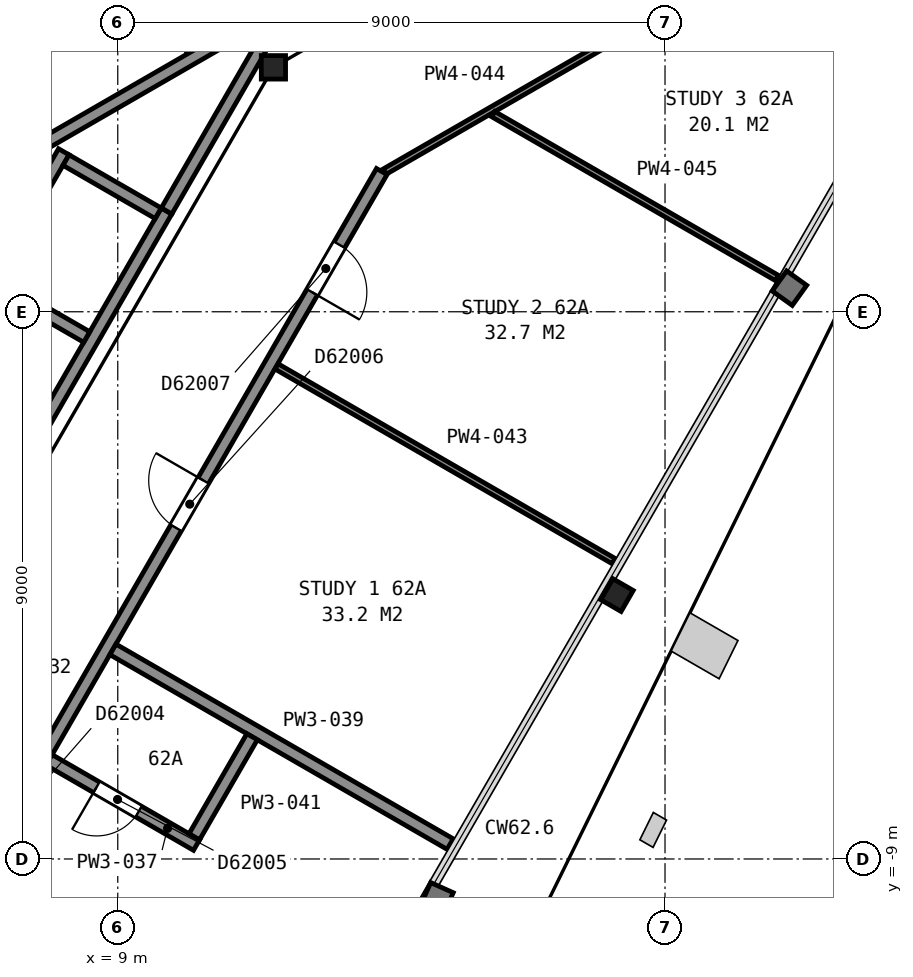
"""IFC4 building model, lengths in metres.
Left out: names, types, materials, properties, quantities, classifications, styles, units other than length and angle.
Written with IfcOpenShell. Run it as: python <this file> out.ifc"""

import sys

from ifc_helpers import new_model, si_unit, direction, frame, frame_2d, origin, origin_2d, place, context, subcontext, project, spatial, rectangle, i_section, extrude, element, fill, save


model = new_model("IFC4")
c1 = context("Model", 3, precision=1e-05, world=origin(), true_north=direction((0.0, 1.0)))
c2 = subcontext(c1, "Body", "Model", "MODEL_VIEW")
j1 = project(units=[si_unit("LENGTHUNIT", "METRE"), si_unit("PLANEANGLEUNIT", "RADIAN")], contexts=[c1])
p1 = place(None, origin())
s1 = spatial("IfcSite", under=j1, at=p1, CompositionType="ELEMENT")
p2 = place(p1, origin())
s2 = spatial("IfcBuilding", under=s1, at=p2, CompositionType="ELEMENT")
p3 = place(p2, frame((0.0, 0.0, 247.1)))
s3 = spatial("IfcBuildingStorey", under=s2, at=p3, CompositionType="ELEMENT", Elevation=247.1)
p4 = place(p3, frame((17.21, -4.66, 0.035), z_axis=(0.0, 0.0, 1.0), x_axis=(-0.5, -0.866025403784, 0.0)))
e1 = element("IfcColumn", 1, at=p4, inside=s3, PredefinedType="COLUMN", context=c2, shape_type="SweptSolid", body=[
    extrude(i_section(OverallWidth=0.399, OverallDepth=0.386, WebThickness=0.021, FlangeThickness=0.033, FilletRadius=0.015, at=origin_2d()), origin(), (0.0, 0.0, 1.0), 3.665),
])
p5 = place(p3, frame((11.56, 4.02, 0.0), z_axis=(0.0, 0.0, 1.0), x_axis=(1.0, 0.0, 0.0)))
e2 = element("IfcColumn", 2, at=p5, inside=s3, PredefinedType="COLUMN", context=c2, shape_type="SweptSolid", body=[
    extrude(i_section(OverallWidth=0.399, OverallDepth=0.386, WebThickness=0.021, FlangeThickness=0.033, FilletRadius=0.015, at=origin_2d()), origin(), (0.0, 0.0, 1.0), 3.7),
])
p6 = place(p3, frame((7.678, 2.701, 0.0), z_axis=(0.0, 0.0, 1.0), x_axis=(0.866019993635, 0.500009370536, 0.0)))
e3 = element("IfcWall", 3, at=p6, inside=s3, PredefinedType="PARTITIONING", context=c2, shape_type="SweptSolid", body=[
    extrude(rectangle(XDim=9.6, YDim=0.2, at=frame_2d((4.8, 0.0))), origin(), (0.0, 0.0, 1.0), 3.45),
])
p7 = place(p3, frame((7.351, -2.587, 0.0), z_axis=(0.0, 0.0, 1.0), x_axis=(0.500002801628, 0.866023786258, 0.0)))
e4 = element("IfcWall", 4, at=p7, inside=s3, PredefinedType="PARTITIONING", context=c2, shape_type="SweptSolid", body=[
    extrude(rectangle(XDim=4.9, YDim=0.2, at=frame_2d((2.45, 0.0))), origin(), (0.0, 0.0, 1.0), 3.7),
])
p8 = place(p3, frame((5.663, -1.612, 0.0), z_axis=(0.0, 0.0, 1.0), x_axis=(0.49998122708, 0.866036242063, 0.0)))
e5 = element("IfcWall", 5, at=p8, inside=s3, PredefinedType="PARTITIONING", context=c2, shape_type="SweptSolid", body=[
    extrude(rectangle(XDim=4.9, YDim=0.2, at=frame_2d((2.45, 0.0))), origin(), (0.0, 0.0, 1.0), 3.7),
])
p9 = place(p3, frame((9.665, 1.62, 0.0), z_axis=(0.0, 0.0, 1.0), x_axis=(-0.866002029911, 0.500040482552, 0.0)))
e6 = element("IfcWall", 6, at=p9, inside=s3, PredefinedType="PARTITIONING", context=c2, shape_type="SweptSolid", body=[
    extrude(rectangle(XDim=1.75, YDim=0.2, at=frame_2d((0.875, 0.0))), origin(), (0.0, 0.0, 1.0), 3.7),
])
p10 = place(p3, frame((8.49, -0.416, 0.0), z_axis=(0.0, 0.0, 1.0), x_axis=(-0.866036909293, 0.499980071345, 0.0)))
e7 = element("IfcWall", 7, at=p10, inside=s3, PredefinedType="PARTITIONING", context=c2, shape_type="SweptSolid", body=[
    extrude(rectangle(XDim=1.75, YDim=0.2, at=frame_2d((0.875, 0.0))), origin(), (0.0, 0.0, 1.0), 3.7),
])
p11 = place(p3, frame((9.803, 1.658, 0.0), z_axis=(0.0, 0.0, 1.0), x_axis=(0.499943114462, 0.866058244174, 0.0)))
e8 = element("IfcWall", 8, at=p11, inside=s3, PredefinedType="PARTITIONING", context=c2, shape_type="SweptSolid", body=[
    extrude(rectangle(XDim=3.576, YDim=0.2, at=frame_2d((1.788, 0.0))), origin(), (0.0, 0.0, 1.0), 3.45),
])
p12 = place(p3, frame((13.342, 2.306, 0.0), z_axis=(0.0, 0.0, 1.0), x_axis=(-0.499983003136, -0.866035216706, 0.0)))
e9 = element("IfcWall", 9, at=p12, inside=s3, PredefinedType="PARTITIONING", context=c2, shape_type="SweptSolid", body=[
    extrude(rectangle(XDim=17.385, YDim=0.2, at=frame_2d((8.692, 0.0))), origin(), (0.0, 0.0, 1.0), 2.713),
])
p13 = place(p12, frame((15.185, 0.0, 0.0)))
e10 = element("IfcOpeningElement", 10, at=p13, cuts=e9, PredefinedType="OPENING", context=c2, shape_type="SweptSolid", body=[
    extrude(rectangle(XDim=0.9, YDim=2.1, at=frame_2d((0.45, 1.05))), frame((0.0, 0.11, 0.0), z_axis=(0.0, -1.0, 0.0), x_axis=(1.0, 0.0, 0.0)), (0.0, 0.0, 1.0), 0.22),
])
p14 = place(p12, frame((12.094, 0.0, 0.0)))
e11 = element("IfcOpeningElement", 11, at=p14, cuts=e9, PredefinedType="OPENING", context=c2, shape_type="SweptSolid", body=[
    extrude(rectangle(XDim=0.9, YDim=2.1, at=frame_2d((0.45, 1.05))), frame((0.0, 0.11, 0.0), z_axis=(0.0, -1.0, 0.0), x_axis=(1.0, 0.0, 0.0)), (0.0, 0.0, 1.0), 0.22),
])
p15 = place(p12, frame((5.867, 0.0, 0.0)))
e12 = element("IfcOpeningElement", 12, at=p15, cuts=e9, PredefinedType="OPENING", context=c2, shape_type="SweptSolid", body=[
    extrude(rectangle(XDim=0.9, YDim=2.1, at=frame_2d((0.45, 1.05))), frame((0.0, 0.11, 0.0), z_axis=(0.0, -1.0, 0.0), x_axis=(1.0, 0.0, 0.0)), (0.0, 0.0, 1.0), 0.22),
])
p16 = place(p12, frame((1.392, 0.0, 0.0)))
e13 = element("IfcOpeningElement", 13, at=p16, cuts=e9, PredefinedType="OPENING", context=c2, shape_type="SweptSolid", body=[
    extrude(rectangle(XDim=0.9, YDim=2.1, at=frame_2d((0.45, 1.05))), frame((0.0, 0.11, 0.0), z_axis=(0.0, -1.0, 0.0), x_axis=(1.0, 0.0, 0.0)), (0.0, 0.0, 1.0), 0.22),
])
p17 = place(p3, frame((7.871, -7.371, 0.0), z_axis=(0.0, 0.0, 1.0), x_axis=(0.866056369097, -0.49994636267, 0.0)))
e14 = element("IfcWall", 14, at=p17, inside=s3, PredefinedType="PARTITIONING", context=c2, shape_type="SweptSolid", body=[
    extrude(rectangle(XDim=2.8, YDim=0.2, at=frame_2d((1.4, 0.0))), origin(), (0.0, 0.0, 1.0), 2.713),
])
p18 = place(p17, frame((0.9, 0.0, 0.0)))
e15 = element("IfcOpeningElement", 15, at=p18, cuts=e14, PredefinedType="OPENING", context=c2, shape_type="SweptSolid", body=[
    extrude(rectangle(XDim=0.8, YDim=2.1, at=frame_2d((0.4, 1.05))), frame((0.0, 0.11, 0.0), z_axis=(0.0, -1.0, 0.0), x_axis=(1.0, 0.0, 0.0)), (0.0, 0.0, 1.0), 0.22),
])
p19 = place(p3, frame((8.921, -5.553, 0.0), z_axis=(0.0, 0.0, 1.0), x_axis=(0.866026868306, -0.499997463366, 0.0)))
e16 = element("IfcWall", 16, at=p19, inside=s3, PredefinedType="PARTITIONING", context=c2, shape_type="SweptSolid", body=[
    extrude(rectangle(XDim=6.404, YDim=0.2, at=frame_2d((3.202, 0.0))), origin(), (0.0, 0.0, 1.0), 2.713),
])
p20 = place(p3, frame((10.259, -8.635, 0.0), z_axis=(0.0, 0.0, 1.0), x_axis=(0.500078449558, 0.865980106173, 0.0)))
e17 = element("IfcWall", 17, at=p20, inside=s3, PredefinedType="PARTITIONING", context=c2, shape_type="SweptSolid", body=[
    extrude(rectangle(XDim=1.9, YDim=0.2, at=frame_2d((0.95, 0.0))), origin(), (0.0, 0.0, 1.0), 2.713),
])
p21 = place(p3, frame((11.612, -0.899, 0.0), z_axis=(0.0, 0.0, 1.0), x_axis=(0.865966403178, -0.500102178127, 0.0)))
e18 = element("IfcWall", 18, at=p21, inside=s3, PredefinedType="PARTITIONING", context=c2, shape_type="SweptSolid", body=[
    extrude(rectangle(XDim=6.4, YDim=0.1, at=frame_2d((3.2, 0.0))), origin(), (0.0, 0.0, 1.0), 2.713),
])
p22 = place(p3, frame((20.756, 6.557, 0.0), z_axis=(0.0, 0.0, 1.0), x_axis=(-0.86606177021, -0.499937006213, 0.0)))
e19 = element("IfcWall", 19, at=p22, inside=s3, PredefinedType="PARTITIONING", context=c2, shape_type="SweptSolid", body=[
    extrude(rectangle(XDim=8.504, YDim=0.1, at=frame_2d((4.252, 0.0))), origin(), (0.0, 0.0, 1.0), 2.713),
])
p23 = place(p22, frame((2.979, 0.0, 0.0)))
e20 = element("IfcOpeningElement", 20, at=p23, cuts=e19, PredefinedType="OPENING", context=c2, shape_type="SweptSolid", body=[
    extrude(rectangle(XDim=0.9, YDim=2.1, at=frame_2d((0.45, 1.05))), frame((0.0, 0.06, 0.0), z_axis=(0.0, -1.0, 0.0), x_axis=(1.0, 0.0, 0.0)), (0.0, 0.0, 1.0), 0.12),
])
p24 = place(p3, frame((15.176, 3.25, 0.0), z_axis=(0.0, 0.0, 1.0), x_axis=(0.865941828667, -0.500144728419, 0.0)))
e21 = element("IfcWall", 21, at=p24, inside=s3, PredefinedType="PARTITIONING", context=c2, shape_type="SweptSolid", body=[
    extrude(rectangle(XDim=5.388, YDim=0.1, at=frame_2d((2.694, 0.0))), origin(), (0.0, 0.0, 1.0), 2.713),
])
p25 = place(p15, origin())
e22 = element("IfcDoor", 22, at=p25, inside=s3, OperationType="SINGLE_SWING_LEFT", PredefinedType="DOOR", context=c2, shape_type="SweptSolid", body=[
    extrude(rectangle(XDim=0.9, YDim=2.1, at=frame_2d((0.45, 1.05))), frame((0.0, 0.025, 0.0), z_axis=(0.0, -1.0, 0.0), x_axis=(1.0, 0.0, 0.0)), (0.0, 0.0, 1.0), 0.05),
])
fill(e12, e22)
p26 = place(p16, origin())
e23 = element("IfcDoor", 23, at=p26, inside=s3, OperationType="SINGLE_SWING_RIGHT", PredefinedType="DOOR", context=c2, shape_type="SweptSolid", body=[
    extrude(rectangle(XDim=0.9, YDim=2.1, at=frame_2d((0.45, 1.05))), frame((0.0, 0.025, 0.0), z_axis=(0.0, -1.0, 0.0), x_axis=(1.0, 0.0, 0.0)), (0.0, 0.0, 1.0), 0.05),
])
fill(e13, e23)
p27 = place(p18, origin())
e24 = element("IfcDoor", 24, at=p27, inside=s3, OperationType="SINGLE_SWING_LEFT", PredefinedType="DOOR", context=c2, shape_type="SweptSolid", body=[
    extrude(rectangle(XDim=0.8, YDim=2.1, at=frame_2d((0.4, 1.05))), frame((0.0, 0.025, 0.0), z_axis=(0.0, -1.0, 0.0), x_axis=(1.0, 0.0, 0.0)), (0.0, 0.0, 1.0), 0.05),
])
fill(e15, e24)
save(model, sys.argv[1])
